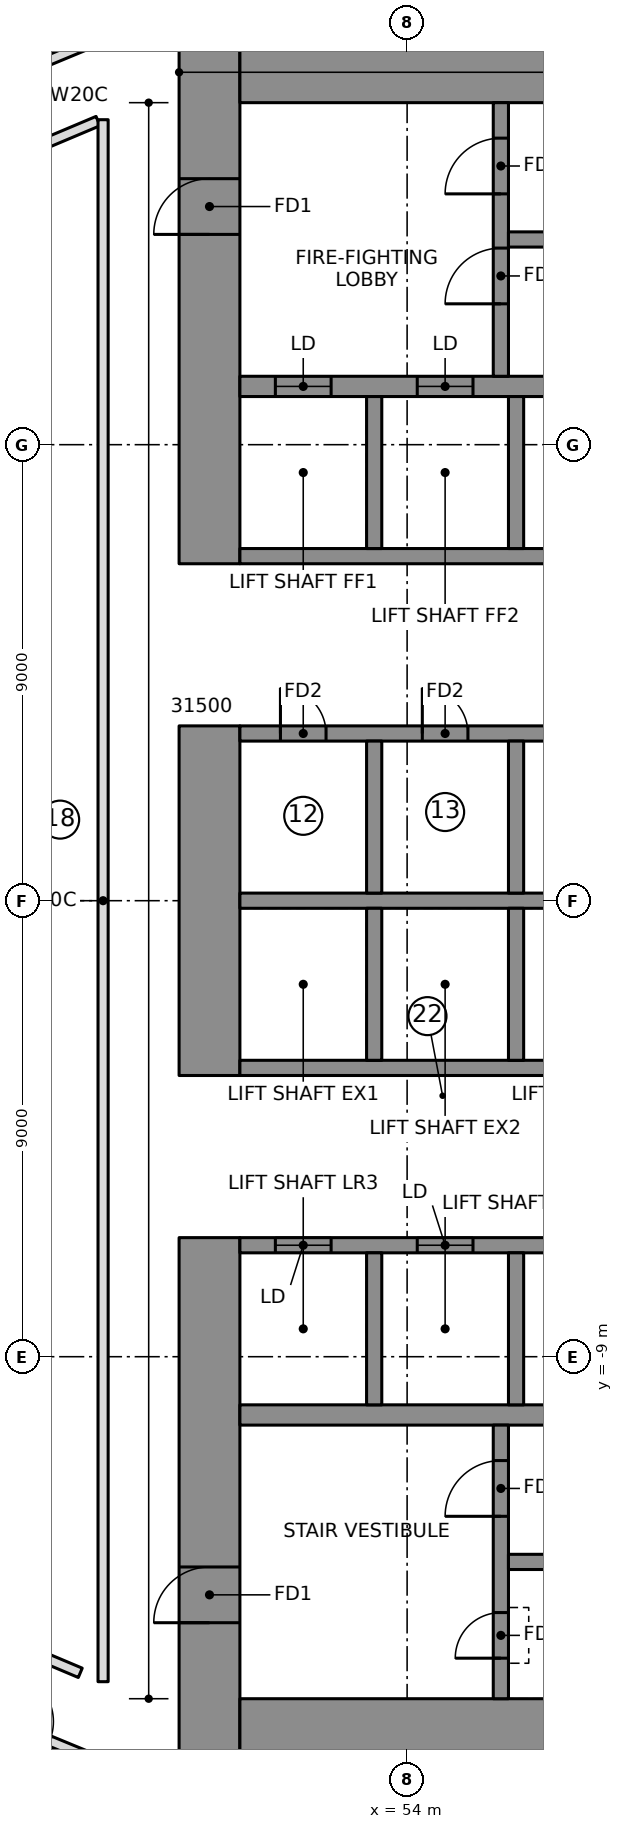
"""IFC4 building model, lengths in metres.
Left out: names, types, materials, properties, quantities, classifications, styles, units other than length and angle.
Written with IfcOpenShell. Run it as: python <this file> out.ifc"""

import sys

from ifc_helpers import new_model, si_unit, direction, frame, frame_2d, origin, place, context, subcontext, project, spatial, rectangle, extrude, element, fill, save


model = new_model("IFC4")
c1 = context("Model", 3, precision=1e-05, world=origin(), true_north=direction((0.0, 1.0)))
c2 = subcontext(c1, "Body", "Model", "MODEL_VIEW")
j1 = project(units=[si_unit("LENGTHUNIT", "METRE"), si_unit("PLANEANGLEUNIT", "RADIAN")], contexts=[c1])
p1 = place(None, origin())
s1 = spatial("IfcSite", under=j1, at=p1, CompositionType="ELEMENT")
p2 = place(p1, origin())
s2 = spatial("IfcBuilding", under=s1, at=p2, CompositionType="ELEMENT")
p3 = place(p2, frame((0.0, 0.0, 68.0)))
s3 = spatial("IfcBuildingStorey", under=s2, at=p3, CompositionType="ELEMENT", Elevation=68.0)
p4 = place(p3, frame((50.1, 6.65, 0.0), z_axis=(0.0, 0.0, 1.0), x_axis=(0.0, 1.0, 0.0)))
e1 = element("IfcWall", 1, at=p4, inside=s3, PredefinedType="SHEAR", context=c2, shape_type="SweptSolid", body=[
    extrude(rectangle(XDim=10.3, YDim=1.2, at=frame_2d((5.15, 0.0))), origin(), (0.0, 0.0, 1.0), 3.55),
])
p5 = place(p4, frame((6.5, 0.0, 0.0)))
e2 = element("IfcOpeningElement", 2, at=p5, cuts=e1, PredefinedType="OPENING", context=c2, shape_type="SweptSolid", body=[
    extrude(rectangle(XDim=1.1, YDim=2.1, at=frame_2d((0.55, 1.05))), frame((0.0, 0.61, 0.0), z_axis=(0.0, -1.0, 0.0), x_axis=(1.0, 0.0, 0.0)), (0.0, 0.0, 1.0), 1.22),
])
p6 = place(p3, frame((50.1, -3.45, 0.0), z_axis=(0.0, 0.0, 1.0), x_axis=(0.0, 1.0, 0.0)))
e3 = element("IfcWall", 3, at=p6, inside=s3, PredefinedType="SHEAR", context=c2, shape_type="SweptSolid", body=[
    extrude(rectangle(XDim=6.9, YDim=1.2, at=frame_2d((3.45, 0.0))), origin(), (0.0, 0.0, 1.0), 3.55),
])
p7 = place(p3, frame((50.1, -16.95, 0.0), z_axis=(0.0, 0.0, 1.0), x_axis=(0.0, 1.0, 0.0)))
e4 = element("IfcWall", 4, at=p7, inside=s3, PredefinedType="SHEAR", context=c2, shape_type="SweptSolid", body=[
    extrude(rectangle(XDim=10.3, YDim=1.2, at=frame_2d((5.15, 0.0))), origin(), (0.0, 0.0, 1.0), 3.55),
])
p8 = place(p7, frame((2.7, 0.0, 0.0)))
e5 = element("IfcOpeningElement", 5, at=p8, cuts=e4, PredefinedType="OPENING", context=c2, shape_type="SweptSolid", body=[
    extrude(rectangle(XDim=1.1, YDim=2.1, at=frame_2d((0.55, 1.05))), frame((0.0, 0.61, 0.0), z_axis=(0.0, -1.0, 0.0), x_axis=(1.0, 0.0, 0.0)), (0.0, 0.0, 1.0), 1.22),
])
for number, where, z_axis, x_axis in (
    (6, (50.7, 16.35, 0.0), (0.0, 0.0, 1.0), (1.0, 0.0, 0.0)),
    (7, (50.7, -16.35, 0.0), (0.0, 0.0, 1.0), (1.0, 0.0, 0.0)),
):
    element("IfcWall", number, at=place(p3, frame(where, z_axis=z_axis, x_axis=x_axis)), inside=s3, PredefinedType="SHEAR", context=c2, shape_type="SweptSolid", body=[
        extrude(rectangle(XDim=14.22, YDim=1.2, at=frame_2d((7.11, 0.0))), origin(), (0.0, 0.0, 1.0), 3.55),
    ])
p9 = place(p3, frame((50.7, 10.15, 0.0), z_axis=(0.0, 0.0, 1.0), x_axis=(1.0, 0.0, 0.0)))
e8 = element("IfcWall", 8, at=p9, inside=s3, PredefinedType="SHEAR", context=c2, shape_type="SweptSolid", body=[
    extrude(rectangle(XDim=13.02, YDim=0.4, at=frame_2d((6.51, 0.0))), origin(), (0.0, 0.0, 1.0), 3.55),
])
p10 = place(p9, frame((0.7, 0.0, 0.0)))
e9 = element("IfcOpeningElement", 9, at=p10, cuts=e8, PredefinedType="OPENING", context=c2, shape_type="SweptSolid", body=[
    extrude(rectangle(XDim=1.1, YDim=2.1, at=frame_2d((0.55, 1.05))), frame((0.0, 0.21, 0.0), z_axis=(0.0, -1.0, 0.0), x_axis=(1.0, 0.0, 0.0)), (0.0, 0.0, 1.0), 0.42),
])
p11 = place(p9, frame((3.5, 0.0, 0.0)))
e10 = element("IfcOpeningElement", 10, at=p11, cuts=e8, PredefinedType="OPENING", context=c2, shape_type="SweptSolid", body=[
    extrude(rectangle(XDim=1.1, YDim=2.1, at=frame_2d((0.55, 1.05))), frame((0.0, 0.21, 0.0), z_axis=(0.0, -1.0, 0.0), x_axis=(1.0, 0.0, 0.0)), (0.0, 0.0, 1.0), 0.42),
])
p12 = place(p3, frame((50.7, -10.15, 0.0), z_axis=(0.0, 0.0, 1.0), x_axis=(1.0, 0.0, 0.0)))
e11 = element("IfcWall", 11, at=p12, inside=s3, PredefinedType="SHEAR", context=c2, shape_type="SweptSolid", body=[
    extrude(rectangle(XDim=13.02, YDim=0.4, at=frame_2d((6.51, 0.0))), origin(), (0.0, 0.0, 1.0), 3.55),
])
p13 = place(p3, frame((50.7, 0.0, 0.0), z_axis=(0.0, 0.0, 1.0), x_axis=(1.0, 0.0, 0.0)))
e12 = element("IfcWall", 12, at=p13, inside=s3, PredefinedType="SHEAR", context=c2, shape_type="SweptSolid", body=[
    extrude(rectangle(XDim=10.9, YDim=0.3, at=frame_2d((5.45, 0.0))), origin(), (0.0, 0.0, 1.0), 3.55),
])
p14 = place(p3, frame((50.7, 3.3, 0.0), z_axis=(0.0, 0.0, 1.0), x_axis=(1.0, 0.0, 0.0)))
e13 = element("IfcWall", 13, at=p14, inside=s3, PredefinedType="SHEAR", context=c2, shape_type="SweptSolid", body=[
    extrude(rectangle(XDim=10.9, YDim=0.3, at=frame_2d((5.45, 0.0))), origin(), (0.0, 0.0, 1.0), 3.55),
])
p15 = place(p14, frame((0.8, 0.0, 0.0)))
e14 = element("IfcOpeningElement", 14, at=p15, cuts=e13, PredefinedType="OPENING", context=c2, shape_type="SweptSolid", body=[
    extrude(rectangle(XDim=0.9, YDim=2.1, at=frame_2d((0.45, 1.05))), frame((0.0, 0.16, 0.0), z_axis=(0.0, -1.0, 0.0), x_axis=(1.0, 0.0, 0.0)), (0.0, 0.0, 1.0), 0.32),
])
p16 = place(p14, frame((3.6, 0.0, 0.0)))
e15 = element("IfcOpeningElement", 15, at=p16, cuts=e13, PredefinedType="OPENING", context=c2, shape_type="SweptSolid", body=[
    extrude(rectangle(XDim=0.9, YDim=2.1, at=frame_2d((0.45, 1.05))), frame((0.0, 0.16, 0.0), z_axis=(0.0, -1.0, 0.0), x_axis=(1.0, 0.0, 0.0)), (0.0, 0.0, 1.0), 0.32),
])
p17 = place(p14, frame((6.4, 0.0, 0.0)))
e16 = element("IfcOpeningElement", 16, at=p17, cuts=e13, PredefinedType="OPENING", context=c2, shape_type="SweptSolid", body=[
    extrude(rectangle(XDim=0.9, YDim=2.1, at=frame_2d((0.45, 1.05))), frame((0.0, 0.16, 0.0), z_axis=(0.0, -1.0, 0.0), x_axis=(1.0, 0.0, 0.0)), (0.0, 0.0, 1.0), 0.32),
])
p18 = place(p14, frame((9.2, 0.0, 0.0)))
e17 = element("IfcOpeningElement", 17, at=p18, cuts=e13, PredefinedType="OPENING", context=c2, shape_type="SweptSolid", body=[
    extrude(rectangle(XDim=0.9, YDim=2.1, at=frame_2d((0.45, 1.05))), frame((0.0, 0.16, 0.0), z_axis=(0.0, -1.0, 0.0), x_axis=(1.0, 0.0, 0.0)), (0.0, 0.0, 1.0), 0.32),
])
p19 = place(p3, frame((50.7, 6.8, 0.0), z_axis=(0.0, 0.0, 1.0), x_axis=(1.0, 0.0, 0.0)))
e18 = element("IfcWall", 18, at=p19, inside=s3, PredefinedType="SHEAR", context=c2, shape_type="SweptSolid", body=[
    extrude(rectangle(XDim=10.9, YDim=0.3, at=frame_2d((5.45, 0.0))), origin(), (0.0, 0.0, 1.0), 3.55),
])
p20 = place(p19, frame((6.3, 0.0, 0.0)))
e19 = element("IfcOpeningElement", 19, at=p20, cuts=e18, PredefinedType="OPENING", context=c2, shape_type="SweptSolid", body=[
    extrude(rectangle(XDim=1.1, YDim=2.1, at=frame_2d((0.55, 1.05))), frame((0.0, 0.16, 0.0), z_axis=(0.0, -1.0, 0.0), x_axis=(1.0, 0.0, 0.0)), (0.0, 0.0, 1.0), 0.32),
])
p21 = place(p19, frame((9.1, 0.0, 0.0)))
e20 = element("IfcOpeningElement", 20, at=p21, cuts=e18, PredefinedType="OPENING", context=c2, shape_type="SweptSolid", body=[
    extrude(rectangle(XDim=1.1, YDim=2.1, at=frame_2d((0.55, 1.05))), frame((0.0, 0.16, 0.0), z_axis=(0.0, -1.0, 0.0), x_axis=(1.0, 0.0, 0.0)), (0.0, 0.0, 1.0), 0.32),
])
for number, where, z_axis, x_axis in (
    (21, (53.35, 0.15, 0.0), (0.0, 0.0, 1.0), (0.0, 1.0, 0.0)),
    (22, (53.35, 6.95, 0.0), (0.0, 0.0, 1.0), (0.0, 1.0, 0.0)),
    (23, (56.15, 0.15, 0.0), (0.0, 0.0, 1.0), (0.0, 1.0, 0.0)),
    (24, (56.15, 6.95, 0.0), (0.0, 0.0, 1.0), (0.0, 1.0, 0.0)),
):
    element("IfcWall", number, at=place(p3, frame(where, z_axis=z_axis, x_axis=x_axis)), inside=s3, PredefinedType="SHEAR", context=c2, shape_type="SweptSolid", body=[
        extrude(rectangle(XDim=3.0, YDim=0.3, at=frame_2d((1.5, 0.0))), origin(), (0.0, 0.0, 1.0), 3.55),
    ])
p22 = place(p3, frame((50.7, -3.3, 0.0), z_axis=(0.0, 0.0, 1.0), x_axis=(1.0, 0.0, 0.0)))
e25 = element("IfcWall", 25, at=p22, inside=s3, PredefinedType="SHEAR", context=c2, shape_type="SweptSolid", body=[
    extrude(rectangle(XDim=10.9, YDim=0.3, at=frame_2d((5.45, 0.0))), origin(), (0.0, 0.0, 1.0), 3.55),
])
p23 = place(p22, frame((9.2, 0.0, 0.0)))
e26 = element("IfcOpeningElement", 26, at=p23, cuts=e25, PredefinedType="OPENING", context=c2, shape_type="SweptSolid", body=[
    extrude(rectangle(XDim=0.9, YDim=2.1, at=frame_2d((0.45, 1.05))), frame((0.0, 0.16, 0.0), z_axis=(0.0, -1.0, 0.0), x_axis=(1.0, 0.0, 0.0)), (0.0, 0.0, 1.0), 0.32),
])
p24 = place(p3, frame((50.7, -6.8, 0.0), z_axis=(0.0, 0.0, 1.0), x_axis=(1.0, 0.0, 0.0)))
e27 = element("IfcWall", 27, at=p24, inside=s3, PredefinedType="SHEAR", context=c2, shape_type="SweptSolid", body=[
    extrude(rectangle(XDim=10.9, YDim=0.3, at=frame_2d((5.45, 0.0))), origin(), (0.0, 0.0, 1.0), 3.55),
])
p25 = place(p24, frame((0.7, 0.0, 0.0)))
e28 = element("IfcOpeningElement", 28, at=p25, cuts=e27, PredefinedType="OPENING", context=c2, shape_type="SweptSolid", body=[
    extrude(rectangle(XDim=1.1, YDim=2.1, at=frame_2d((0.55, 1.05))), frame((0.0, 0.16, 0.0), z_axis=(0.0, -1.0, 0.0), x_axis=(1.0, 0.0, 0.0)), (0.0, 0.0, 1.0), 0.32),
])
p26 = place(p24, frame((3.5, 0.0, 0.0)))
e29 = element("IfcOpeningElement", 29, at=p26, cuts=e27, PredefinedType="OPENING", context=c2, shape_type="SweptSolid", body=[
    extrude(rectangle(XDim=1.1, YDim=2.1, at=frame_2d((0.55, 1.05))), frame((0.0, 0.16, 0.0), z_axis=(0.0, -1.0, 0.0), x_axis=(1.0, 0.0, 0.0)), (0.0, 0.0, 1.0), 0.32),
])
p27 = place(p24, frame((6.3, 0.0, 0.0)))
e30 = element("IfcOpeningElement", 30, at=p27, cuts=e27, PredefinedType="OPENING", context=c2, shape_type="SweptSolid", body=[
    extrude(rectangle(XDim=1.1, YDim=2.1, at=frame_2d((0.55, 1.05))), frame((0.0, 0.16, 0.0), z_axis=(0.0, -1.0, 0.0), x_axis=(1.0, 0.0, 0.0)), (0.0, 0.0, 1.0), 0.32),
])
p28 = place(p24, frame((9.1, 0.0, 0.0)))
e31 = element("IfcOpeningElement", 31, at=p28, cuts=e27, PredefinedType="OPENING", context=c2, shape_type="SweptSolid", body=[
    extrude(rectangle(XDim=1.1, YDim=2.1, at=frame_2d((0.55, 1.05))), frame((0.0, 0.16, 0.0), z_axis=(0.0, -1.0, 0.0), x_axis=(1.0, 0.0, 0.0)), (0.0, 0.0, 1.0), 0.32),
])
for number, where, z_axis, x_axis in (
    (32, (53.35, -3.15, 0.0), (0.0, 0.0, 1.0), (0.0, 1.0, 0.0)),
    (33, (53.35, -9.95, 0.0), (0.0, 0.0, 1.0), (0.0, 1.0, 0.0)),
    (34, (56.15, -3.15, 0.0), (0.0, 0.0, 1.0), (0.0, 1.0, 0.0)),
    (35, (56.15, -9.95, 0.0), (0.0, 0.0, 1.0), (0.0, 1.0, 0.0)),
):
    element("IfcWall", number, at=place(p3, frame(where, z_axis=z_axis, x_axis=x_axis)), inside=s3, PredefinedType="SHEAR", context=c2, shape_type="SweptSolid", body=[
        extrude(rectangle(XDim=3.0, YDim=0.3, at=frame_2d((1.5, 0.0))), origin(), (0.0, 0.0, 1.0), 3.55),
    ])
p29 = place(p3, frame((55.85, 10.35, 0.0), z_axis=(0.0, 0.0, 1.0), x_axis=(0.0, 1.0, 0.0)))
e36 = element("IfcWall", 36, at=p29, inside=s3, PredefinedType="SHEAR", context=c2, shape_type="SweptSolid", body=[
    extrude(rectangle(XDim=5.4, YDim=0.3, at=frame_2d((2.7, 0.0))), origin(), (0.0, 0.0, 1.0), 3.55),
])
p30 = place(p29, frame((1.43, 0.0, 0.0)))
e37 = element("IfcOpeningElement", 37, at=p30, cuts=e36, PredefinedType="OPENING", context=c2, shape_type="SweptSolid", body=[
    extrude(rectangle(XDim=1.1, YDim=2.1, at=frame_2d((0.55, 1.05))), frame((0.0, 0.16, 0.0), z_axis=(0.0, -1.0, 0.0), x_axis=(1.0, 0.0, 0.0)), (0.0, 0.0, 1.0), 0.32),
])
p31 = place(p29, frame((3.6, 0.0, 0.0)))
e38 = element("IfcOpeningElement", 38, at=p31, cuts=e36, PredefinedType="OPENING", context=c2, shape_type="SweptSolid", body=[
    extrude(rectangle(XDim=1.1, YDim=2.1, at=frame_2d((0.55, 1.05))), frame((0.0, 0.16, 0.0), z_axis=(0.0, -1.0, 0.0), x_axis=(1.0, 0.0, 0.0)), (0.0, 0.0, 1.0), 0.32),
])
p32 = place(p3, frame((55.85, -15.75, 0.0), z_axis=(0.0, 0.0, 1.0), x_axis=(0.0, 1.0, 0.0)))
e39 = element("IfcWall", 39, at=p32, inside=s3, PredefinedType="SHEAR", context=c2, shape_type="SweptSolid", body=[
    extrude(rectangle(XDim=5.4, YDim=0.3, at=frame_2d((2.7, 0.0))), origin(), (0.0, 0.0, 1.0), 3.55),
])
p33 = place(p32, frame((3.6, 0.0, 0.0)))
e40 = element("IfcOpeningElement", 40, at=p33, cuts=e39, PredefinedType="OPENING", context=c2, shape_type="SweptSolid", body=[
    extrude(rectangle(XDim=1.1, YDim=2.1, at=frame_2d((0.55, 1.05))), frame((0.0, 0.16, 0.0), z_axis=(0.0, -1.0, 0.0), x_axis=(1.0, 0.0, 0.0)), (0.0, 0.0, 1.0), 0.32),
])
p34 = place(p32, frame((0.8, 0.0, 0.0)))
e41 = element("IfcOpeningElement", 41, at=p34, cuts=e39, PredefinedType="OPENING", context=c2, shape_type="SweptSolid", body=[
    extrude(rectangle(XDim=0.9, YDim=2.1, at=frame_2d((0.45, 1.05))), frame((0.0, 0.16, 0.0), z_axis=(0.0, -1.0, 0.0), x_axis=(1.0, 0.0, 0.0)), (0.0, 0.0, 1.0), 0.32),
])
for number, where, z_axis, x_axis in (
    (42, (56.0, 13.05, 0.0), (0.0, 0.0, 1.0), (1.0, 0.0, 0.0)),
    (43, (56.0, -13.05, 0.0), (0.0, 0.0, 1.0), (1.0, 0.0, 0.0)),
):
    element("IfcWall", number, at=place(p3, frame(where, z_axis=z_axis, x_axis=x_axis)), inside=s3, PredefinedType="SHEAR", context=c2, shape_type="SweptSolid", body=[
        extrude(rectangle(XDim=7.72, YDim=0.3, at=frame_2d((3.86, 0.0))), origin(), (0.0, 0.0, 1.0), 3.55),
    ])
p35 = place(p3, frame((43.85, 13.677, 0.0), z_axis=(0.0, 0.0, 1.0), x_axis=(0.921265924084, 0.388933281068, 0.0)))
e44 = element("IfcWall", 44, at=p35, inside=s3, PredefinedType="PARTITIONING", context=c2, shape_type="SweptSolid", body=[
    extrude(rectangle(XDim=4.396, YDim=0.2, at=frame_2d((2.198, 0.0))), origin(), (0.0, 0.0, 1.0), 3.25),
])
p36 = place(p35, frame((1.508, 0.0, 0.0)))
e45 = element("IfcOpeningElement", 45, at=p36, cuts=e44, PredefinedType="OPENING", context=c2, shape_type="SweptSolid", body=[
    extrude(rectangle(XDim=1.5, YDim=2.1, at=frame_2d((0.75, 1.05))), frame((0.0, 0.11, 0.0), z_axis=(0.0, -1.0, 0.0), x_axis=(1.0, 0.0, 0.0)), (0.0, 0.0, 1.0), 0.22),
])
p37 = place(p3, frame((47.55, -15.239, 0.0), z_axis=(0.0, 0.0, 1.0), x_axis=(-0.921269894054, 0.388923877269, 0.0)))
e46 = element("IfcWall", 46, at=p37, inside=s3, PredefinedType="PARTITIONING", context=c2, shape_type="SweptSolid", body=[
    extrude(rectangle(XDim=4.016, YDim=0.2, at=frame_2d((2.008, 0.0))), origin(), (0.0, 0.0, 1.0), 3.25),
])
p38 = place(p3, frame((47.704, 16.911, 0.0), z_axis=(0.0, 0.0, 1.0), x_axis=(-0.923461497361, -0.383691103484, 0.0)))
e47 = element("IfcWall", 47, at=p38, inside=s3, PredefinedType="PARTITIONING", context=c2, shape_type="SweptSolid", body=[
    extrude(rectangle(XDim=5.328, YDim=0.2, at=frame_2d((2.664, 0.0))), origin(), (0.0, 0.0, 1.0), 3.25),
])
p39 = place(p3, frame((42.784, -14.867, 0.0), z_axis=(0.0, 0.0, 1.0), x_axis=(0.92451459323, -0.381146647507, 0.0)))
e48 = element("IfcWall", 48, at=p39, inside=s3, PredefinedType="PARTITIONING", context=c2, shape_type="SweptSolid", body=[
    extrude(rectangle(XDim=5.322, YDim=0.2, at=frame_2d((2.661, 0.0))), origin(), (0.0, 0.0, 1.0), 3.25),
])
p40 = place(p39, frame((3.5, 0.0, 0.0)))
e49 = element("IfcOpeningElement", 49, at=p40, cuts=e48, PredefinedType="OPENING", context=c2, shape_type="SweptSolid", body=[
    extrude(rectangle(XDim=1.0, YDim=2.1, at=frame_2d((0.5, 1.05))), frame((0.0, 0.11, 0.0), z_axis=(0.0, -1.0, 0.0), x_axis=(1.0, 0.0, 0.0)), (0.0, 0.0, 1.0), 0.22),
])
p41 = place(p3, frame((48.0, 15.414, 0.0), z_axis=(0.0, 0.0, 1.0), x_axis=(0.0, -1.0, 0.0)))
e50 = element("IfcWall", 50, at=p41, inside=s3, PredefinedType="PARTITIONING", context=c2, shape_type="SweptSolid", body=[
    extrude(rectangle(XDim=30.828, YDim=0.2, at=frame_2d((15.414, 0.0))), origin(), (0.0, 0.0, 1.0), 3.25),
])
p42 = place(p10, origin())
e51 = element("IfcDoor", 51, at=p42, inside=s3, OperationType="DOUBLE_DOOR_SLIDING", PredefinedType="DOOR", context=c2, shape_type="SweptSolid", body=[
    extrude(rectangle(XDim=1.1, YDim=2.1, at=frame_2d((0.55, 1.05))), frame((0.0, 0.025, 0.0), z_axis=(0.0, -1.0, 0.0), x_axis=(1.0, 0.0, 0.0)), (0.0, 0.0, 1.0), 0.05),
])
fill(e9, e51)
p43 = place(p11, origin())
e52 = element("IfcDoor", 52, at=p43, inside=s3, OperationType="DOUBLE_DOOR_SLIDING", PredefinedType="DOOR", context=c2, shape_type="SweptSolid", body=[
    extrude(rectangle(XDim=1.1, YDim=2.1, at=frame_2d((0.55, 1.05))), frame((0.0, 0.025, 0.0), z_axis=(0.0, -1.0, 0.0), x_axis=(1.0, 0.0, 0.0)), (0.0, 0.0, 1.0), 0.05),
])
fill(e10, e52)
p44 = place(p25, origin())
e53 = element("IfcDoor", 53, at=p44, inside=s3, OperationType="DOUBLE_DOOR_SLIDING", PredefinedType="DOOR", context=c2, shape_type="SweptSolid", body=[
    extrude(rectangle(XDim=1.1, YDim=2.1, at=frame_2d((0.55, 1.05))), frame((0.0, 0.025, 0.0), z_axis=(0.0, -1.0, 0.0), x_axis=(1.0, 0.0, 0.0)), (0.0, 0.0, 1.0), 0.05),
])
fill(e28, e53)
p45 = place(p26, origin())
e54 = element("IfcDoor", 54, at=p45, inside=s3, OperationType="DOUBLE_DOOR_SLIDING", PredefinedType="DOOR", context=c2, shape_type="SweptSolid", body=[
    extrude(rectangle(XDim=1.1, YDim=2.1, at=frame_2d((0.55, 1.05))), frame((0.0, 0.025, 0.0), z_axis=(0.0, -1.0, 0.0), x_axis=(1.0, 0.0, 0.0)), (0.0, 0.0, 1.0), 0.05),
])
fill(e29, e54)
p46 = place(p30, origin())
e55 = element("IfcDoor", 55, at=p46, inside=s3, OperationType="SINGLE_SWING_RIGHT", PredefinedType="DOOR", context=c2, shape_type="SweptSolid", body=[
    extrude(rectangle(XDim=1.1, YDim=2.1, at=frame_2d((0.55, 1.05))), frame((0.0, 0.025, 0.0), z_axis=(0.0, -1.0, 0.0), x_axis=(1.0, 0.0, 0.0)), (0.0, 0.0, 1.0), 0.05),
])
fill(e37, e55)
p47 = place(p31, origin())
e56 = element("IfcDoor", 56, at=p47, inside=s3, OperationType="SINGLE_SWING_RIGHT", PredefinedType="DOOR", context=c2, shape_type="SweptSolid", body=[
    extrude(rectangle(XDim=1.1, YDim=2.1, at=frame_2d((0.55, 1.05))), frame((0.0, 0.025, 0.0), z_axis=(0.0, -1.0, 0.0), x_axis=(1.0, 0.0, 0.0)), (0.0, 0.0, 1.0), 0.05),
])
fill(e38, e56)
p48 = place(p33, origin())
e57 = element("IfcDoor", 57, at=p48, inside=s3, OperationType="SINGLE_SWING_RIGHT", PredefinedType="DOOR", context=c2, shape_type="SweptSolid", body=[
    extrude(rectangle(XDim=1.1, YDim=2.1, at=frame_2d((0.55, 1.05))), frame((0.0, 0.025, 0.0), z_axis=(0.0, -1.0, 0.0), x_axis=(1.0, 0.0, 0.0)), (0.0, 0.0, 1.0), 0.05),
])
fill(e40, e57)
p49 = place(p5, origin())
e58 = element("IfcDoor", 58, at=p49, inside=s3, OperationType="SINGLE_SWING_RIGHT", PredefinedType="DOOR", context=c2, shape_type="SweptSolid", body=[
    extrude(rectangle(XDim=1.1, YDim=2.1, at=frame_2d((0.55, 1.05))), frame((0.0, 0.025, 0.0), z_axis=(0.0, -1.0, 0.0), x_axis=(1.0, 0.0, 0.0)), (0.0, 0.0, 1.0), 0.05),
])
fill(e2, e58)
p50 = place(p8, origin())
e59 = element("IfcDoor", 59, at=p50, inside=s3, OperationType="SINGLE_SWING_RIGHT", PredefinedType="DOOR", context=c2, shape_type="SweptSolid", body=[
    extrude(rectangle(XDim=1.1, YDim=2.1, at=frame_2d((0.55, 1.05))), frame((0.0, 0.025, 0.0), z_axis=(0.0, -1.0, 0.0), x_axis=(1.0, 0.0, 0.0)), (0.0, 0.0, 1.0), 0.05),
])
fill(e5, e59)
p51 = place(p34, origin())
e60 = element("IfcDoor", 60, at=p51, inside=s3, OperationType="SINGLE_SWING_LEFT", PredefinedType="DOOR", context=c2, shape_type="SweptSolid", body=[
    extrude(rectangle(XDim=0.9, YDim=2.1, at=frame_2d((0.45, 1.05))), frame((0.0, 0.025, 0.0), z_axis=(0.0, -1.0, 0.0), x_axis=(1.0, 0.0, 0.0)), (0.0, 0.0, 1.0), 0.05),
])
fill(e41, e60)
p52 = place(p15, origin())
e61 = element("IfcDoor", 61, at=p52, inside=s3, OperationType="SINGLE_SWING_LEFT", PredefinedType="DOOR", context=c2, shape_type="SweptSolid", body=[
    extrude(rectangle(XDim=0.9, YDim=2.1, at=frame_2d((0.45, 1.05))), frame((0.0, 0.025, 0.0), z_axis=(0.0, -1.0, 0.0), x_axis=(1.0, 0.0, 0.0)), (0.0, 0.0, 1.0), 0.05),
])
fill(e14, e61)
p53 = place(p16, origin())
e62 = element("IfcDoor", 62, at=p53, inside=s3, OperationType="SINGLE_SWING_LEFT", PredefinedType="DOOR", context=c2, shape_type="SweptSolid", body=[
    extrude(rectangle(XDim=0.9, YDim=2.1, at=frame_2d((0.45, 1.05))), frame((0.0, 0.025, 0.0), z_axis=(0.0, -1.0, 0.0), x_axis=(1.0, 0.0, 0.0)), (0.0, 0.0, 1.0), 0.05),
])
fill(e15, e62)
save(model, sys.argv[1])
